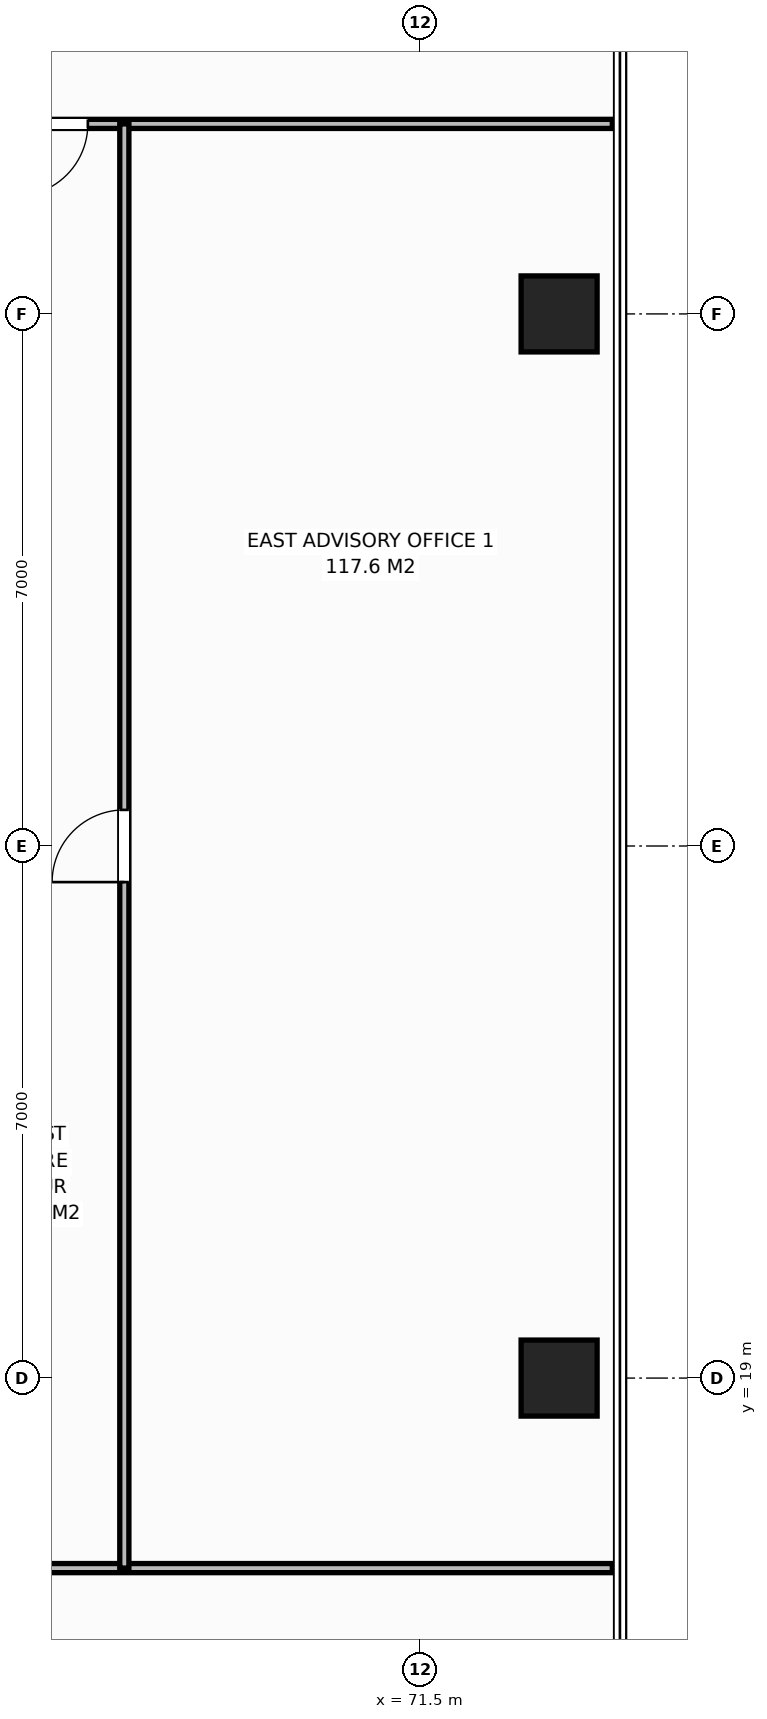
"""IFC4 building model, lengths in metres.
Left out: names, types, materials, properties, quantities, classifications, styles, units other than length and angle.
Written with IfcOpenShell. Run it as: python <this file> out.ifc"""

import sys

from ifc_helpers import new_model, si_unit, direction, frame, frame_2d, origin, origin_2d, place, context, subcontext, project, spatial, rectangle, extrude, element, fill, save


model = new_model("IFC4")
c1 = context("Model", 3, precision=1e-05, world=origin(), true_north=direction((0.0, 1.0)))
c2 = subcontext(c1, "Body", "Model", "MODEL_VIEW")
j1 = project(units=[si_unit("LENGTHUNIT", "METRE"), si_unit("PLANEANGLEUNIT", "RADIAN")], contexts=[c1])
p1 = place(None, origin())
s1 = spatial("IfcSite", under=j1, at=p1, CompositionType="ELEMENT")
p2 = place(p1, origin())
s2 = spatial("IfcBuilding", under=s1, at=p2, CompositionType="ELEMENT")
p3 = place(p2, frame((0.0, 0.0, 151.8)))
s3 = spatial("IfcBuildingStorey", under=s2, at=p3, CompositionType="ELEMENT", Elevation=151.8)
for number, where, z_axis, x_axis in (
    (1, (73.32, 19.0, 0.0), (0.0, 0.0, 1.0), (1.0, 0.0, 0.0)),
    (2, (73.32, 33.0, 0.0), (0.0, 0.0, 1.0), (1.0, 0.0, 0.0)),
):
    element("IfcColumn", number, at=place(p3, frame(where, z_axis=z_axis, x_axis=x_axis)), inside=s3, PredefinedType="COLUMN", context=c2, shape_type="SweptSolid", body=[
        extrude(rectangle(XDim=1.0, YDim=1.0, at=origin_2d()), origin(), (0.0, 0.0, 1.0), 3.8),
    ])
p4 = place(p3, frame((63.483, 35.5, 0.0), z_axis=(0.0, 0.0, 1.0), x_axis=(1.0, 0.0, 0.0)))
e3 = element("IfcWall", 3, at=p4, inside=s3, PredefinedType="PARTITIONING", context=c2, shape_type="SweptSolid", body=[
    extrude(rectangle(XDim=10.537, YDim=0.12, at=frame_2d((5.269, 0.0))), origin(), (0.0, 0.0, 1.0), 3.572),
])
p5 = place(p4, frame((2.687, 0.0, 0.0)))
e4 = element("IfcOpeningElement", 4, at=p5, cuts=e3, PredefinedType="OPENING", context=c2, shape_type="SweptSolid", body=[
    extrude(rectangle(XDim=0.95, YDim=2.15, at=frame_2d((0.475, 1.075))), frame((0.0, 0.07, 0.0), z_axis=(0.0, -1.0, 0.0), x_axis=(1.0, 0.0, 0.0)), (0.0, 0.0, 1.0), 0.14),
])
p6 = place(p3, frame((59.968, 16.5, 0.0), z_axis=(0.0, 0.0, 1.0), x_axis=(1.0, 0.0, 0.0)))
e5 = element("IfcWall", 5, at=p6, inside=s3, PredefinedType="PARTITIONING", context=c2, shape_type="SweptSolid", body=[
    extrude(rectangle(XDim=14.052, YDim=0.12, at=frame_2d((7.026, 0.0))), origin(), (0.0, 0.0, 1.0), 3.572),
])
p7 = place(p6, frame((0.48, 0.0, 0.0)))
e6 = element("IfcOpeningElement", 6, at=p7, cuts=e5, PredefinedType="OPENING", context=c2, shape_type="SweptSolid", body=[
    extrude(rectangle(XDim=0.95, YDim=2.15, at=frame_2d((0.475, 1.075))), frame((0.0, 0.07, 0.0), z_axis=(0.0, -1.0, 0.0), x_axis=(1.0, 0.0, 0.0)), (0.0, 0.0, 1.0), 0.14),
])
p8 = place(p3, frame((67.6, 16.5, 0.0), z_axis=(0.0, 0.0, 1.0), x_axis=(0.0, 1.0, 0.0)))
e7 = element("IfcWall", 7, at=p8, inside=s3, PredefinedType="PARTITIONING", context=c2, shape_type="SweptSolid", body=[
    extrude(rectangle(XDim=19.0, YDim=0.12, at=frame_2d((9.5, 0.0))), origin(), (0.0, 0.0, 1.0), 3.572),
])
p9 = place(p8, frame((9.025, 0.0, 0.0)))
e8 = element("IfcOpeningElement", 8, at=p9, cuts=e7, PredefinedType="OPENING", context=c2, shape_type="SweptSolid", body=[
    extrude(rectangle(XDim=0.95, YDim=2.15, at=frame_2d((0.475, 1.075))), frame((0.0, 0.07, 0.0), z_axis=(0.0, -1.0, 0.0), x_axis=(1.0, 0.0, 0.0)), (0.0, 0.0, 1.0), 0.14),
])
p10 = place(p5, origin())
e9 = element("IfcDoor", 9, at=p10, inside=s3, OperationType="SINGLE_SWING_RIGHT", PredefinedType="DOOR", context=c2, shape_type="SweptSolid", body=[
    extrude(rectangle(XDim=0.95, YDim=2.15, at=frame_2d((0.475, 1.075))), frame((0.0, 0.025, 0.0), z_axis=(0.0, -1.0, 0.0), x_axis=(1.0, 0.0, 0.0)), (0.0, 0.0, 1.0), 0.05),
])
fill(e4, e9)
p11 = place(p9, origin())
e10 = element("IfcDoor", 10, at=p11, inside=s3, OperationType="SINGLE_SWING_LEFT", PredefinedType="DOOR", context=c2, shape_type="SweptSolid", body=[
    extrude(rectangle(XDim=0.95, YDim=2.15, at=frame_2d((0.475, 1.075))), frame((0.0, 0.025, 0.0), z_axis=(0.0, -1.0, 0.0), x_axis=(1.0, 0.0, 0.0)), (0.0, 0.0, 1.0), 0.05),
])
fill(e8, e10)
save(model, sys.argv[1])
